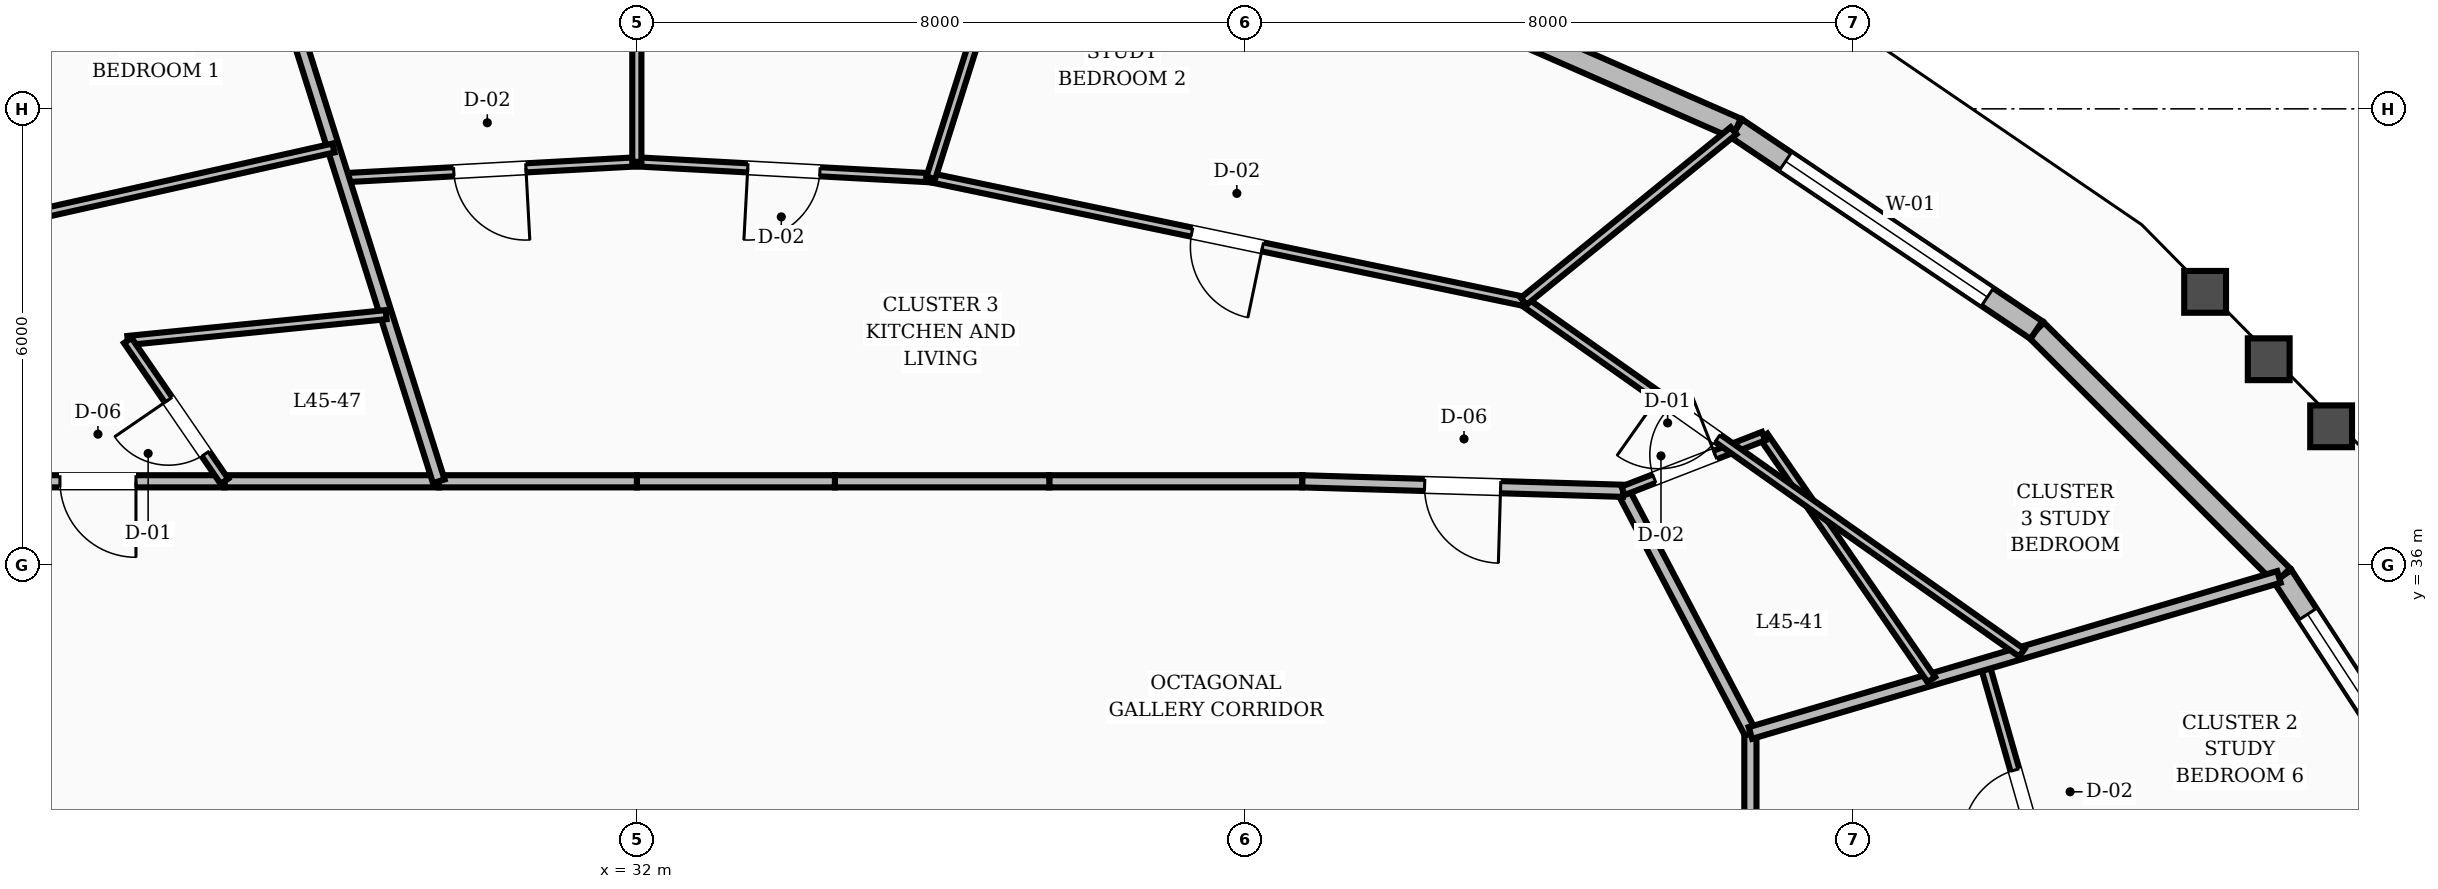
"""IFC4 building model, lengths in metres.
Left out: names, types, materials, properties, quantities, classifications, styles, units other than length and angle.
Written with IfcOpenShell. Run it as: python <this file> out.ifc"""

import sys

from ifc_helpers import new_model, si_unit, direction, frame, frame_2d, origin, place, context, subcontext, project, spatial, rectangle, extrude, element, fill, save


model = new_model("IFC4")
c1 = context("Model", 3, precision=1e-05, world=origin(), true_north=direction((0.0, 1.0)))
c2 = subcontext(c1, "Body", "Model", "MODEL_VIEW")
j1 = project(units=[si_unit("LENGTHUNIT", "METRE"), si_unit("PLANEANGLEUNIT", "RADIAN")], contexts=[c1])
p1 = place(None, origin())
s1 = spatial("IfcSite", under=j1, at=p1, CompositionType="ELEMENT")
p2 = place(p1, origin())
s2 = spatial("IfcBuilding", under=s1, at=p2, CompositionType="ELEMENT")
p3 = place(p2, frame((0.0, 0.0, 174.8)))
s3 = spatial("IfcBuildingStorey", under=s2, at=p3, CompositionType="ELEMENT", Elevation=174.8)
p4 = place(p3, frame((56.058, 32.167, 0.0), z_axis=(0.0, 0.0, 1.0), x_axis=(-0.54628130625, 0.837601775573, 0.0)))
e1 = element("IfcWall", 1, at=p4, inside=s3, PredefinedType="STANDARD", context=c2, shape_type="SweptSolid", body=[
    extrude(rectangle(XDim=4.405, YDim=0.28, at=frame_2d((2.202, 0.0))), origin(), (0.0, 0.0, 1.0), 2.82),
])
p5 = place(p4, frame((0.602, 0.0, 0.8)))
e2 = element("IfcOpeningElement", 2, at=p5, cuts=e1, PredefinedType="OPENING", context=c2, shape_type="SweptSolid", body=[
    extrude(rectangle(XDim=3.2, YDim=1.65, at=frame_2d((1.6, 0.825))), frame((0.0, 0.15, 0.0), z_axis=(0.0, -1.0, 0.0), x_axis=(1.0, 0.0, 0.0)), (0.0, 0.0, 1.0), 0.3),
])
p6 = place(p3, frame((53.652, 35.856, 0.0), z_axis=(0.0, 0.0, 1.0), x_axis=(-0.707640043992, 0.706573115919, 0.0)))
e3 = element("IfcWall", 3, at=p6, inside=s3, PredefinedType="STANDARD", context=c2, shape_type="SweptSolid", body=[
    extrude(rectangle(XDim=4.576, YDim=0.28, at=frame_2d((2.288, 0.0))), origin(), (0.0, 0.0, 1.0), 2.82),
])
p7 = place(p3, frame((50.413, 39.09, 0.0), z_axis=(0.0, 0.0, 1.0), x_axis=(-0.829776575502, 0.558095721851, 0.0)))
e4 = element("IfcWall", 4, at=p7, inside=s3, PredefinedType="STANDARD", context=c2, shape_type="SweptSolid", body=[
    extrude(rectangle(XDim=4.756, YDim=0.28, at=frame_2d((2.378, 0.0))), origin(), (0.0, 0.0, 1.0), 2.82),
])
p8 = place(p7, frame((0.778, 0.0, 0.8)))
e5 = element("IfcOpeningElement", 5, at=p8, cuts=e4, PredefinedType="OPENING", context=c2, shape_type="SweptSolid", body=[
    extrude(rectangle(XDim=3.2, YDim=1.65, at=frame_2d((1.6, 0.825))), frame((0.0, 0.15, 0.0), z_axis=(0.0, -1.0, 0.0), x_axis=(1.0, 0.0, 0.0)), (0.0, 0.0, 1.0), 0.3),
])
p9 = place(p3, frame((46.467, 41.744, 0.0), z_axis=(0.0, 0.0, 1.0), x_axis=(-0.915983961181, 0.401214883647, 0.0)))
e6 = element("IfcWall", 6, at=p9, inside=s3, PredefinedType="STANDARD", context=c2, shape_type="SweptSolid", body=[
    extrude(rectangle(XDim=4.915, YDim=0.28, at=frame_2d((2.458, 0.0))), origin(), (0.0, 0.0, 1.0), 2.82),
])
p10 = place(p3, frame((46.65, 30.068, 0.0), z_axis=(0.0, 0.0, 1.0), x_axis=(0.0, 1.0, 0.0)))
e7 = element("IfcWall", 7, at=p10, inside=s3, PredefinedType="SOLIDWALL", context=c2, shape_type="SweptSolid", body=[
    extrude(rectangle(XDim=3.721, YDim=0.16, at=frame_2d((1.86, 0.0))), origin(), (0.0, 0.0, 1.0), 2.8),
])
p11 = place(p3, frame((46.65, 33.789, 0.0), z_axis=(0.0, 0.0, 1.0), x_axis=(-0.46527115782, 0.885168204185, 0.0)))
e8 = element("IfcWall", 8, at=p11, inside=s3, PredefinedType="SOLIDWALL", context=c2, shape_type="SweptSolid", body=[
    extrude(rectangle(XDim=3.6, YDim=0.16, at=frame_2d((1.8, 0.0))), origin(), (0.0, 0.0, 1.0), 2.8),
])
p12 = place(p3, frame((44.975, 36.975, 0.0), z_axis=(0.0, 0.0, 1.0), x_axis=(-0.999561990195, 0.029594387265, 0.0)))
e9 = element("IfcWall", 9, at=p12, inside=s3, PredefinedType="SOLIDWALL", context=c2, shape_type="SweptSolid", body=[
    extrude(rectangle(XDim=4.224, YDim=0.16, at=frame_2d((2.112, 0.0))), origin(), (0.0, 0.0, 1.0), 2.8),
])
p13 = place(p12, frame((1.612, 0.0, 0.0)))
e10 = element("IfcOpeningElement", 10, at=p13, cuts=e9, PredefinedType="OPENING", context=c2, shape_type="SweptSolid", body=[
    extrude(rectangle(XDim=1.0, YDim=2.1, at=frame_2d((0.5, 1.05))), frame((0.0, 0.09, 0.0), z_axis=(0.0, -1.0, 0.0), x_axis=(1.0, 0.0, 0.0)), (0.0, 0.0, 1.0), 0.18),
])
p14 = place(p3, frame((40.753, 37.1, 0.0), z_axis=(0.0, 0.0, 1.0), x_axis=(-1.0, 0.0, 0.0)))
e11 = element("IfcWall", 11, at=p14, inside=s3, PredefinedType="SOLIDWALL", context=c2, shape_type="SweptSolid", body=[
    extrude(rectangle(XDim=3.327, YDim=0.16, at=frame_2d((1.664, 0.0))), origin(), (0.0, 0.0, 1.0), 2.8),
])
p15 = place(p3, frame((37.426, 37.1, 0.0), z_axis=(0.0, 0.0, 1.0), x_axis=(-1.0, 0.0, 0.0)))
e12 = element("IfcWall", 12, at=p15, inside=s3, PredefinedType="SOLIDWALL", context=c2, shape_type="SweptSolid", body=[
    extrude(rectangle(XDim=2.821, YDim=0.16, at=frame_2d((1.41, 0.0))), origin(), (0.0, 0.0, 1.0), 2.8),
])
for number, where, z_axis, x_axis in (
    (13, (34.606, 37.1, 0.0), (0.0, 0.0, 1.0), (-1.0, 0.0, 0.0)),
    (14, (32.0, 37.1, 0.0), (0.0, 0.0, 1.0), (-1.0, 0.0, 0.0)),
):
    element("IfcWall", number, at=place(p3, frame(where, z_axis=z_axis, x_axis=x_axis)), inside=s3, PredefinedType="SOLIDWALL", context=c2, shape_type="SweptSolid", body=[
        extrude(rectangle(XDim=2.606, YDim=0.16, at=frame_2d((1.303, 0.0))), origin(), (0.0, 0.0, 1.0), 2.8),
    ])
p16 = place(p3, frame((29.394, 37.1, 0.0), z_axis=(0.0, 0.0, 1.0), x_axis=(-1.0, 0.0, 0.0)))
e15 = element("IfcWall", 15, at=p16, inside=s3, PredefinedType="SOLIDWALL", context=c2, shape_type="SweptSolid", body=[
    extrude(rectangle(XDim=2.821, YDim=0.16, at=frame_2d((1.41, 0.0))), origin(), (0.0, 0.0, 1.0), 2.8),
])
p17 = place(p3, frame((26.574, 37.1, 0.0), z_axis=(0.0, 0.0, 1.0), x_axis=(-1.0, 0.0, 0.0)))
e16 = element("IfcWall", 16, at=p17, inside=s3, PredefinedType="SOLIDWALL", context=c2, shape_type="SweptSolid", body=[
    extrude(rectangle(XDim=3.327, YDim=0.16, at=frame_2d((1.664, 0.0))), origin(), (0.0, 0.0, 1.0), 2.8),
])
p18 = place(p17, frame((1.164, 0.0, 0.0)))
e17 = element("IfcOpeningElement", 17, at=p18, cuts=e16, PredefinedType="OPENING", context=c2, shape_type="SweptSolid", body=[
    extrude(rectangle(XDim=1.0, YDim=2.1, at=frame_2d((0.5, 1.05))), frame((0.0, 0.09, 0.0), z_axis=(0.0, -1.0, 0.0), x_axis=(1.0, 0.0, 0.0)), (0.0, 0.0, 1.0), 0.18),
])
p19 = place(p3, frame((50.789, 30.991, 0.0), z_axis=(0.0, 0.0, 1.0), x_axis=(-0.274604022912, 0.961557398495, 0.0)))
e18 = element("IfcWall", 18, at=p19, inside=s3, PredefinedType="PARTITIONING", context=c2, shape_type="SweptSolid", body=[
    extrude(rectangle(XDim=3.855, YDim=0.12, at=frame_2d((1.927, 0.0))), origin(), (0.0, 0.0, 1.0), 2.8),
])
p20 = place(p19, frame((1.452, 0.0, 0.0)))
e19 = element("IfcOpeningElement", 19, at=p20, cuts=e18, PredefinedType="OPENING", context=c2, shape_type="SweptSolid", body=[
    extrude(rectangle(XDim=0.95, YDim=2.1, at=frame_2d((0.475, 1.05))), frame((0.0, 0.07, 0.0), z_axis=(0.0, -1.0, 0.0), x_axis=(1.0, 0.0, 0.0)), (0.0, 0.0, 1.0), 0.14),
])
p21 = place(p3, frame((46.65, 33.789, 0.0), z_axis=(0.0, 0.0, 1.0), x_axis=(0.959073837525, 0.283156095069, 0.0)))
e20 = element("IfcWall", 20, at=p21, inside=s3, PredefinedType="SOLIDWALL", context=c2, shape_type="SweptSolid", body=[
    extrude(rectangle(XDim=7.25, YDim=0.16, at=frame_2d((3.625, 0.0))), origin(), (0.0, 0.0, 1.0), 2.8),
])
p22 = place(p3, frame((49.031, 34.492, 0.0), z_axis=(0.0, 0.0, 1.0), x_axis=(-0.567383758206, 0.823453502588, 0.0)))
e21 = element("IfcWall", 21, at=p22, inside=s3, PredefinedType="PARTITIONING", context=c2, shape_type="SweptSolid", body=[
    extrude(rectangle(XDim=3.889, YDim=0.12, at=frame_2d((1.944, 0.0))), origin(), (0.0, 0.0, 1.0), 2.8),
])
p23 = place(p3, frame((44.975, 36.975, 0.0), z_axis=(0.0, 0.0, 1.0), x_axis=(0.932006981142, 0.362440322126, 0.0)))
e22 = element("IfcWall", 22, at=p23, inside=s3, PredefinedType="PARTITIONING", context=c2, shape_type="SweptSolid", body=[
    extrude(rectangle(XDim=1.984, YDim=0.12, at=frame_2d((0.992, 0.0))), origin(), (0.0, 0.0, 1.0), 2.8),
])
p24 = place(p23, frame((0.44, 0.0, 0.0)))
e23 = element("IfcOpeningElement", 23, at=p24, cuts=e22, PredefinedType="OPENING", context=c2, shape_type="SweptSolid", body=[
    extrude(rectangle(XDim=0.86, YDim=2.1, at=frame_2d((0.43, 1.05))), frame((0.0, 0.07, 0.0), z_axis=(0.0, -1.0, 0.0), x_axis=(1.0, 0.0, 0.0)), (0.0, 0.0, 1.0), 0.14),
])
p25 = place(p3, frame((50.221, 34.843, 0.0), z_axis=(0.0, 0.0, 1.0), x_axis=(-0.817010879992, 0.57662225241, 0.0)))
e24 = element("IfcWall", 24, at=p25, inside=s3, PredefinedType="PARTITIONING", context=c2, shape_type="SweptSolid", body=[
    extrude(rectangle(XDim=8.021, YDim=0.12, at=frame_2d((4.011, 0.0))), origin(), (0.0, 0.0, 1.0), 2.8),
])
p26 = place(p25, frame((4.898, 0.0, 0.0)))
e25 = element("IfcOpeningElement", 25, at=p26, cuts=e24, PredefinedType="OPENING", context=c2, shape_type="SweptSolid", body=[
    extrude(rectangle(XDim=0.95, YDim=2.1, at=frame_2d((0.475, 1.05))), frame((0.0, 0.07, 0.0), z_axis=(0.0, -1.0, 0.0), x_axis=(1.0, 0.0, 0.0)), (0.0, 0.0, 1.0), 0.14),
])
p27 = place(p3, frame((43.667, 39.468, 0.0), z_axis=(0.0, 0.0, 1.0), x_axis=(-0.978978125213, 0.203965267519, 0.0)))
e26 = element("IfcWall", 26, at=p27, inside=s3, PredefinedType="PARTITIONING", context=c2, shape_type="SweptSolid", body=[
    extrude(rectangle(XDim=7.967, YDim=0.12, at=frame_2d((3.983, 0.0))), origin(), (0.0, 0.0, 1.0), 2.8),
])
p28 = place(p27, frame((3.509, 0.0, 0.0)))
e27 = element("IfcOpeningElement", 27, at=p28, cuts=e26, PredefinedType="OPENING", context=c2, shape_type="SweptSolid", body=[
    extrude(rectangle(XDim=0.95, YDim=2.1, at=frame_2d((0.475, 1.05))), frame((0.0, 0.07, 0.0), z_axis=(0.0, -1.0, 0.0), x_axis=(1.0, 0.0, 0.0)), (0.0, 0.0, 1.0), 0.14),
])
p29 = place(p3, frame((43.667, 39.468, 0.0), z_axis=(0.0, 0.0, 1.0), x_axis=(0.776032133051, 0.630693371197, 0.0)))
e28 = element("IfcWall", 28, at=p29, inside=s3, PredefinedType="PARTITIONING", context=c2, shape_type="SweptSolid", body=[
    extrude(rectangle(XDim=3.558, YDim=0.12, at=frame_2d((1.779, 0.0))), origin(), (0.0, 0.0, 1.0), 2.8),
])
p30 = place(p3, frame((35.868, 41.093, 0.0), z_axis=(0.0, 0.0, 1.0), x_axis=(-0.998539976993, 0.054017722528, 0.0)))
e29 = element("IfcWall", 29, at=p30, inside=s3, PredefinedType="PARTITIONING", context=c2, shape_type="SweptSolid", body=[
    extrude(rectangle(XDim=3.873, YDim=0.12, at=frame_2d((1.937, 0.0))), origin(), (0.0, 0.0, 1.0), 2.8),
])
p31 = place(p30, frame((1.462, 0.0, 0.0)))
e30 = element("IfcOpeningElement", 30, at=p31, cuts=e29, PredefinedType="OPENING", context=c2, shape_type="SweptSolid", body=[
    extrude(rectangle(XDim=0.95, YDim=2.1, at=frame_2d((0.475, 1.05))), frame((0.0, 0.07, 0.0), z_axis=(0.0, -1.0, 0.0), x_axis=(1.0, 0.0, 0.0)), (0.0, 0.0, 1.0), 0.14),
])
p32 = place(p3, frame((35.868, 41.093, 0.0), z_axis=(0.0, 0.0, 1.0), x_axis=(0.30135188561, 0.953512999932, 0.0)))
e31 = element("IfcWall", 31, at=p32, inside=s3, PredefinedType="PARTITIONING", context=c2, shape_type="SweptSolid", body=[
    extrude(rectangle(XDim=3.974, YDim=0.12, at=frame_2d((1.987, 0.0))), origin(), (0.0, 0.0, 1.0), 2.8),
])
p33 = place(p3, frame((32.0, 41.302, 0.0), z_axis=(0.0, 0.0, 1.0), x_axis=(-0.998539976993, -0.054017722528, 0.0)))
e32 = element("IfcWall", 32, at=p33, inside=s3, PredefinedType="PARTITIONING", context=c2, shape_type="SweptSolid", body=[
    extrude(rectangle(XDim=3.873, YDim=0.12, at=frame_2d((1.937, 0.0))), origin(), (0.0, 0.0, 1.0), 2.8),
])
p34 = place(p33, frame((1.462, 0.0, 0.0)))
e33 = element("IfcOpeningElement", 33, at=p34, cuts=e32, PredefinedType="OPENING", context=c2, shape_type="SweptSolid", body=[
    extrude(rectangle(XDim=0.95, YDim=2.1, at=frame_2d((0.475, 1.05))), frame((0.0, 0.07, 0.0), z_axis=(0.0, -1.0, 0.0), x_axis=(1.0, 0.0, 0.0)), (0.0, 0.0, 1.0), 0.14),
])
p35 = place(p3, frame((32.0, 41.302, 0.0), z_axis=(0.0, 0.0, 1.0), x_axis=(0.0, 1.0, 0.0)))
e34 = element("IfcWall", 34, at=p35, inside=s3, PredefinedType="PARTITIONING", context=c2, shape_type="SweptSolid", body=[
    extrude(rectangle(XDim=3.988, YDim=0.12, at=frame_2d((1.994, 0.0))), origin(), (0.0, 0.0, 1.0), 2.8),
])
p36 = place(p3, frame((29.394, 37.1, 0.0), z_axis=(0.0, 0.0, 1.0), x_axis=(-0.301346102792, 0.953514827537, 0.0)))
e35 = element("IfcWall", 35, at=p36, inside=s3, PredefinedType="SOLIDWALL", context=c2, shape_type="SweptSolid", body=[
    extrude(rectangle(XDim=8.162, YDim=0.16, at=frame_2d((4.081, 0.0))), origin(), (0.0, 0.0, 1.0), 2.8),
])
p37 = place(p3, frame((28.701, 39.292, 0.0), z_axis=(0.0, 0.0, 1.0), x_axis=(-0.995030110262, -0.099574493074, 0.0)))
e36 = element("IfcWall", 36, at=p37, inside=s3, PredefinedType="PARTITIONING", context=c2, shape_type="SweptSolid", body=[
    extrude(rectangle(XDim=3.416, YDim=0.12, at=frame_2d((1.708, 0.0))), origin(), (0.0, 0.0, 1.0), 2.8),
])
p38 = place(p3, frame((26.574, 37.1, 0.0), z_axis=(0.0, 0.0, 1.0), x_axis=(-0.565712100387, 0.82460282529, 0.0)))
e37 = element("IfcWall", 37, at=p38, inside=s3, PredefinedType="PARTITIONING", context=c2, shape_type="SweptSolid", body=[
    extrude(rectangle(XDim=2.246, YDim=0.12, at=frame_2d((1.123, 0.0))), origin(), (0.0, 0.0, 1.0), 2.8),
])
p39 = place(p38, frame((0.44, 0.0, 0.0)))
e38 = element("IfcOpeningElement", 38, at=p39, cuts=e37, PredefinedType="OPENING", context=c2, shape_type="SweptSolid", body=[
    extrude(rectangle(XDim=0.86, YDim=2.1, at=frame_2d((0.43, 1.05))), frame((0.0, 0.07, 0.0), z_axis=(0.0, -1.0, 0.0), x_axis=(1.0, 0.0, 0.0)), (0.0, 0.0, 1.0), 0.14),
])
p40 = place(p3, frame((28.009, 41.485, 0.0), z_axis=(0.0, 0.0, 1.0), x_axis=(-0.975790457845, -0.218707527028, 0.0)))
e39 = element("IfcWall", 39, at=p40, inside=s3, PredefinedType="PARTITIONING", context=c2, shape_type="SweptSolid", body=[
    extrude(rectangle(XDim=8.159, YDim=0.12, at=frame_2d((4.08, 0.0))), origin(), (0.0, 0.0, 1.0), 2.8),
])
p41 = place(p40, frame((4.997, 0.0, 0.0)))
e40 = element("IfcOpeningElement", 40, at=p41, cuts=e39, PredefinedType="OPENING", context=c2, shape_type="SweptSolid", body=[
    extrude(rectangle(XDim=0.95, YDim=2.1, at=frame_2d((0.475, 1.05))), frame((0.0, 0.07, 0.0), z_axis=(0.0, -1.0, 0.0), x_axis=(1.0, 0.0, 0.0)), (0.0, 0.0, 1.0), 0.14),
])
p42 = place(p5, origin())
e41 = element("IfcWindow", 41, at=p42, inside=s3, PartitioningType="SINGLE_PANEL", PredefinedType="WINDOW", context=c2, shape_type="SweptSolid", body=[
    extrude(rectangle(XDim=3.2, YDim=1.65, at=frame_2d((1.6, 0.825))), frame((0.0, 0.03, 0.0), z_axis=(0.0, -1.0, 0.0), x_axis=(1.0, 0.0, 0.0)), (0.0, 0.0, 1.0), 0.06),
])
fill(e2, e41)
p43 = place(p8, origin())
e42 = element("IfcWindow", 42, at=p43, inside=s3, PartitioningType="SINGLE_PANEL", PredefinedType="WINDOW", context=c2, shape_type="SweptSolid", body=[
    extrude(rectangle(XDim=3.2, YDim=1.65, at=frame_2d((1.6, 0.825))), frame((0.0, 0.03, 0.0), z_axis=(0.0, -1.0, 0.0), x_axis=(1.0, 0.0, 0.0)), (0.0, 0.0, 1.0), 0.06),
])
fill(e5, e42)
p44 = place(p20, origin())
e43 = element("IfcDoor", 43, at=p44, inside=s3, OperationType="SINGLE_SWING_LEFT", PredefinedType="DOOR", context=c2, shape_type="SweptSolid", body=[
    extrude(rectangle(XDim=0.95, YDim=2.1, at=frame_2d((0.475, 1.05))), frame((0.0, 0.025, 0.0), z_axis=(0.0, -1.0, 0.0), x_axis=(1.0, 0.0, 0.0)), (0.0, 0.0, 1.0), 0.05),
])
fill(e19, e43)
p45 = place(p24, origin())
e44 = element("IfcDoor", 44, at=p45, inside=s3, OperationType="SINGLE_SWING_RIGHT", PredefinedType="DOOR", context=c2, shape_type="SweptSolid", body=[
    extrude(rectangle(XDim=0.86, YDim=2.1, at=frame_2d((0.43, 1.05))), frame((0.0, 0.025, 0.0), z_axis=(0.0, -1.0, 0.0), x_axis=(1.0, 0.0, 0.0)), (0.0, 0.0, 1.0), 0.05),
])
fill(e23, e44)
p46 = place(p13, origin())
e45 = element("IfcDoor", 45, at=p46, inside=s3, OperationType="SINGLE_SWING_LEFT", PredefinedType="DOOR", context=c2, shape_type="SweptSolid", body=[
    extrude(rectangle(XDim=1.0, YDim=2.1, at=frame_2d((0.5, 1.05))), frame((0.0, 0.025, 0.0), z_axis=(0.0, -1.0, 0.0), x_axis=(1.0, 0.0, 0.0)), (0.0, 0.0, 1.0), 0.05),
])
fill(e10, e45)
p47 = place(p26, origin())
e46 = element("IfcDoor", 46, at=p47, inside=s3, OperationType="SINGLE_SWING_RIGHT", PredefinedType="DOOR", context=c2, shape_type="SweptSolid", body=[
    extrude(rectangle(XDim=0.95, YDim=2.1, at=frame_2d((0.475, 1.05))), frame((0.0, 0.025, 0.0), z_axis=(0.0, -1.0, 0.0), x_axis=(1.0, 0.0, 0.0)), (0.0, 0.0, 1.0), 0.05),
])
fill(e25, e46)
p48 = place(p28, origin())
e47 = element("IfcDoor", 47, at=p48, inside=s3, OperationType="SINGLE_SWING_LEFT", PredefinedType="DOOR", context=c2, shape_type="SweptSolid", body=[
    extrude(rectangle(XDim=0.95, YDim=2.1, at=frame_2d((0.475, 1.05))), frame((0.0, 0.025, 0.0), z_axis=(0.0, -1.0, 0.0), x_axis=(1.0, 0.0, 0.0)), (0.0, 0.0, 1.0), 0.05),
])
fill(e27, e47)
p49 = place(p31, origin())
e48 = element("IfcDoor", 48, at=p49, inside=s3, OperationType="SINGLE_SWING_RIGHT", PredefinedType="DOOR", context=c2, shape_type="SweptSolid", body=[
    extrude(rectangle(XDim=0.95, YDim=2.1, at=frame_2d((0.475, 1.05))), frame((0.0, 0.025, 0.0), z_axis=(0.0, -1.0, 0.0), x_axis=(1.0, 0.0, 0.0)), (0.0, 0.0, 1.0), 0.05),
])
fill(e30, e48)
p50 = place(p34, origin())
e49 = element("IfcDoor", 49, at=p50, inside=s3, OperationType="SINGLE_SWING_LEFT", PredefinedType="DOOR", context=c2, shape_type="SweptSolid", body=[
    extrude(rectangle(XDim=0.95, YDim=2.1, at=frame_2d((0.475, 1.05))), frame((0.0, 0.025, 0.0), z_axis=(0.0, -1.0, 0.0), x_axis=(1.0, 0.0, 0.0)), (0.0, 0.0, 1.0), 0.05),
])
fill(e33, e49)
p51 = place(p39, origin())
e50 = element("IfcDoor", 50, at=p51, inside=s3, OperationType="SINGLE_SWING_RIGHT", PredefinedType="DOOR", context=c2, shape_type="SweptSolid", body=[
    extrude(rectangle(XDim=0.86, YDim=2.1, at=frame_2d((0.43, 1.05))), frame((0.0, 0.025, 0.0), z_axis=(0.0, -1.0, 0.0), x_axis=(1.0, 0.0, 0.0)), (0.0, 0.0, 1.0), 0.05),
])
fill(e38, e50)
p52 = place(p18, origin())
e51 = element("IfcDoor", 51, at=p52, inside=s3, OperationType="SINGLE_SWING_LEFT", PredefinedType="DOOR", context=c2, shape_type="SweptSolid", body=[
    extrude(rectangle(XDim=1.0, YDim=2.1, at=frame_2d((0.5, 1.05))), frame((0.0, 0.025, 0.0), z_axis=(0.0, -1.0, 0.0), x_axis=(1.0, 0.0, 0.0)), (0.0, 0.0, 1.0), 0.05),
])
fill(e17, e51)
save(model, sys.argv[1])
